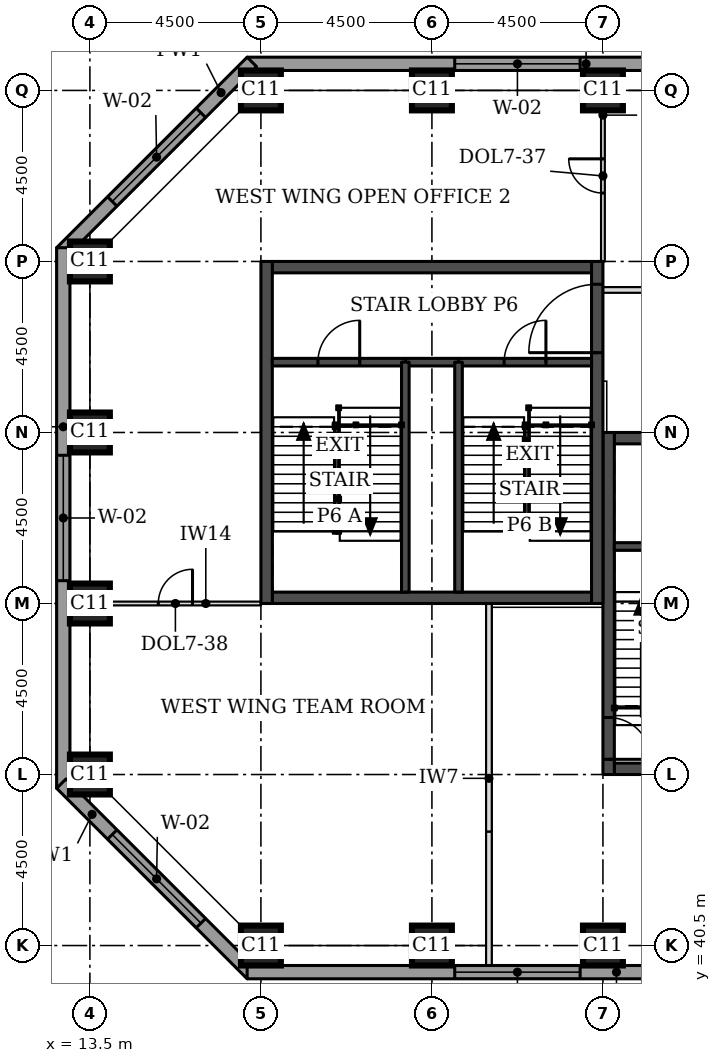
"""IFC4 building model, lengths in metres.
Left out: names, types, materials, properties, quantities, classifications, styles, units other than length and angle.
Written with IfcOpenShell. Run it as: python <this file> out.ifc"""

import sys

from ifc_helpers import new_model, si_unit, direction, frame, frame_2d, origin, origin_2d, place, context, subcontext, project, spatial, rectangle, extrude, element, fill, save


model = new_model("IFC4")
c1 = context("Model", 3, precision=1e-05, world=origin(), true_north=direction((0.0, 1.0)))
c2 = subcontext(c1, "Body", "Model", "MODEL_VIEW")
j1 = project(units=[si_unit("LENGTHUNIT", "METRE"), si_unit("PLANEANGLEUNIT", "RADIAN")], contexts=[c1])
p1 = place(None, origin())
s1 = spatial("IfcSite", under=j1, at=p1, CompositionType="ELEMENT")
p2 = place(p1, origin())
s2 = spatial("IfcBuilding", under=s1, at=p2, CompositionType="ELEMENT")
p3 = place(p2, frame((0.0, 0.0, 134.4)))
s3 = spatial("IfcBuildingStorey", under=s2, at=p3, CompositionType="ELEMENT", Elevation=134.4)
for number, where, z_axis, x_axis in (
    (1, (18.0, 40.5, 0.0), (0.0, 0.0, 1.0), (1.0, 0.0, 0.0)),
    (2, (22.5, 40.5, 0.0), (0.0, 0.0, 1.0), (1.0, 0.0, 0.0)),
    (3, (27.0, 40.5, 0.0), (0.0, 0.0, 1.0), (1.0, 0.0, 0.0)),
    (4, (13.5, 45.0, 0.0), (0.0, 0.0, 1.0), (1.0, 0.0, 0.0)),
    (5, (13.5, 49.5, 0.0), (0.0, 0.0, 1.0), (1.0, 0.0, 0.0)),
    (6, (13.5, 54.0, 0.0), (0.0, 0.0, 1.0), (1.0, 0.0, 0.0)),
    (7, (13.5, 58.5, 0.0), (0.0, 0.0, 1.0), (1.0, 0.0, 0.0)),
    (8, (18.0, 63.0, 0.0), (0.0, 0.0, 1.0), (1.0, 0.0, 0.0)),
    (9, (22.5, 63.0, 0.0), (0.0, 0.0, 1.0), (1.0, 0.0, 0.0)),
    (10, (27.0, 63.0, 0.0), (0.0, 0.0, 1.0), (1.0, 0.0, 0.0)),
):
    element("IfcColumn", number, at=place(p3, frame(where, z_axis=z_axis, x_axis=x_axis)), inside=s3, PredefinedType="COLUMN", context=c2, shape_type="SweptSolid", body=[
        extrude(rectangle(XDim=1.05, YDim=1.05, at=origin_2d()), origin(), (0.0, 0.0, 1.0), 3.7),
    ])
p4 = place(p3, frame((27.3, 45.15, 0.0), z_axis=(0.0, 0.0, 1.0), x_axis=(1.0, 0.0, 0.0)))
e11 = element("IfcWall", 11, at=p4, inside=s3, PredefinedType="SHEAR", context=c2, shape_type="SweptSolid", body=[
    extrude(rectangle(XDim=8.4, YDim=0.3, at=frame_2d((4.2, 0.0))), origin(), (0.0, 0.0, 1.0), 3.7),
])
p5 = place(p4, frame((5.2, 0.0, 0.0)))
e12 = element("IfcOpeningElement", 12, at=p5, cuts=e11, PredefinedType="OPENING", context=c2, shape_type="SweptSolid", body=[
    extrude(rectangle(XDim=1.0, YDim=2.1, at=frame_2d((0.5, 1.05))), frame((0.0, 0.16, 0.0), z_axis=(0.0, -1.0, 0.0), x_axis=(1.0, 0.0, 0.0)), (0.0, 0.0, 1.0), 0.32),
])
p6 = place(p3, frame((27.3, 53.85, 0.0), z_axis=(0.0, 0.0, 1.0), x_axis=(1.0, 0.0, 0.0)))
e13 = element("IfcWall", 13, at=p6, inside=s3, PredefinedType="SHEAR", context=c2, shape_type="SweptSolid", body=[
    extrude(rectangle(XDim=8.4, YDim=0.3, at=frame_2d((4.2, 0.0))), origin(), (0.0, 0.0, 1.0), 3.7),
])
p7 = place(p6, frame((6.4, 0.0, 0.0)))
e14 = element("IfcOpeningElement", 14, at=p7, cuts=e13, PredefinedType="OPENING", context=c2, shape_type="SweptSolid", body=[
    extrude(rectangle(XDim=1.1, YDim=2.1, at=frame_2d((0.55, 1.05))), frame((0.0, 0.16, 0.0), z_axis=(0.0, -1.0, 0.0), x_axis=(1.0, 0.0, 0.0)), (0.0, 0.0, 1.0), 0.32),
])
p8 = place(p3, frame((27.15, 45.0, 0.0), z_axis=(0.0, 0.0, 1.0), x_axis=(0.0, 1.0, 0.0)))
e15 = element("IfcWall", 15, at=p8, inside=s3, PredefinedType="SHEAR", context=c2, shape_type="SweptSolid", body=[
    extrude(rectangle(XDim=9.0, YDim=0.3, at=frame_2d((4.5, 0.0))), origin(), (0.0, 0.0, 1.0), 3.7),
])
p9 = place(p8, frame((0.4, 0.0, 0.0)))
e16 = element("IfcOpeningElement", 16, at=p9, cuts=e15, PredefinedType="OPENING", context=c2, shape_type="SweptSolid", body=[
    extrude(rectangle(XDim=1.1, YDim=2.1, at=frame_2d((0.55, 1.05))), frame((0.0, 0.16, 0.0), z_axis=(0.0, -1.0, 0.0), x_axis=(1.0, 0.0, 0.0)), (0.0, 0.0, 1.0), 0.32),
])
for number, where, z_axis, x_axis in (
    (17, (18.3, 49.65, 0.0), (0.0, 0.0, 1.0), (1.0, 0.0, 0.0)),
    (18, (18.3, 58.35, 0.0), (0.0, 0.0, 1.0), (1.0, 0.0, 0.0)),
):
    element("IfcWall", number, at=place(p3, frame(where, z_axis=z_axis, x_axis=x_axis)), inside=s3, PredefinedType="SHEAR", context=c2, shape_type="SweptSolid", body=[
        extrude(rectangle(XDim=8.4, YDim=0.3, at=frame_2d((4.2, 0.0))), origin(), (0.0, 0.0, 1.0), 3.7),
    ])
p10 = place(p3, frame((18.15, 49.5, 0.0), z_axis=(0.0, 0.0, 1.0), x_axis=(0.0, 1.0, 0.0)))
e19 = element("IfcWall", 19, at=p10, inside=s3, PredefinedType="SHEAR", context=c2, shape_type="SweptSolid", body=[
    extrude(rectangle(XDim=9.0, YDim=0.3, at=frame_2d((4.5, 0.0))), origin(), (0.0, 0.0, 1.0), 3.7),
])
p11 = place(p3, frame((26.85, 49.5, 0.0), z_axis=(0.0, 0.0, 1.0), x_axis=(0.0, 1.0, 0.0)))
e20 = element("IfcWall", 20, at=p11, inside=s3, PredefinedType="SHEAR", context=c2, shape_type="SweptSolid", body=[
    extrude(rectangle(XDim=9.0, YDim=0.3, at=frame_2d((4.5, 0.0))), origin(), (0.0, 0.0, 1.0), 3.7),
])
p12 = place(p11, frame((6.6, 0.0, 0.0)))
e21 = element("IfcOpeningElement", 21, at=p12, cuts=e20, PredefinedType="OPENING", context=c2, shape_type="SweptSolid", body=[
    extrude(rectangle(XDim=1.8, YDim=2.1, at=frame_2d((0.9, 1.05))), frame((0.0, 0.16, 0.0), z_axis=(0.0, -1.0, 0.0), x_axis=(1.0, 0.0, 0.0)), (0.0, 0.0, 1.0), 0.32),
])
p13 = place(p3, frame((35.475, 63.7, 0.0), z_axis=(0.0, 0.0, 1.0), x_axis=(-1.0, 0.0, 0.0)))
e22 = element("IfcWall", 22, at=p13, inside=s3, PredefinedType="STANDARD", context=c2, shape_type="SweptSolid", body=[
    extrude(rectangle(XDim=17.837, YDim=0.35, at=frame_2d((8.919, 0.0))), origin(), (0.0, 0.0, 1.0), 3.525),
])
p14 = place(p13, frame((0.5, 0.0, 0.9)))
e23 = element("IfcOpeningElement", 23, at=p14, cuts=e22, PredefinedType="OPENING", context=c2, shape_type="SweptSolid", body=[
    extrude(rectangle(XDim=3.3, YDim=1.9, at=frame_2d((1.65, 0.95))), frame((0.0, 0.185, 0.0), z_axis=(0.0, -1.0, 0.0), x_axis=(1.0, 0.0, 0.0)), (0.0, 0.0, 1.0), 0.37),
])
p15 = place(p13, frame((9.075, 0.0, 0.9)))
e24 = element("IfcOpeningElement", 24, at=p15, cuts=e22, PredefinedType="OPENING", context=c2, shape_type="SweptSolid", body=[
    extrude(rectangle(XDim=3.3, YDim=1.9, at=frame_2d((1.65, 0.95))), frame((0.0, 0.185, 0.0), z_axis=(0.0, -1.0, 0.0), x_axis=(1.0, 0.0, 0.0)), (0.0, 0.0, 1.0), 0.37),
])
p16 = place(p3, frame((17.761, 63.751, 0.0), z_axis=(0.0, 0.0, 1.0), x_axis=(-0.707106781187, -0.707106781187, 0.0)))
e25 = element("IfcWall", 25, at=p16, inside=s3, PredefinedType="STANDARD", context=c2, shape_type="SweptSolid", body=[
    extrude(rectangle(XDim=7.089, YDim=0.35, at=frame_2d((3.544, 0.0))), origin(), (0.0, 0.0, 1.0), 3.525),
])
p17 = place(p16, frame((1.894, 0.0, 0.9)))
e26 = element("IfcOpeningElement", 26, at=p17, cuts=e25, PredefinedType="OPENING", context=c2, shape_type="SweptSolid", body=[
    extrude(rectangle(XDim=3.3, YDim=1.9, at=frame_2d((1.65, 0.95))), frame((0.0, 0.185, 0.0), z_axis=(0.0, -1.0, 0.0), x_axis=(1.0, 0.0, 0.0)), (0.0, 0.0, 1.0), 0.37),
])
p18 = place(p3, frame((12.8, 58.862, 0.0), z_axis=(0.0, 0.0, 1.0), x_axis=(0.0, -1.0, 0.0)))
e27 = element("IfcWall", 27, at=p18, inside=s3, PredefinedType="STANDARD", context=c2, shape_type="SweptSolid", body=[
    extrude(rectangle(XDim=14.225, YDim=0.35, at=frame_2d((7.112, 0.0))), origin(), (0.0, 0.0, 1.0), 3.525),
])
p19 = place(p18, frame((5.462, 0.0, 0.9)))
e28 = element("IfcOpeningElement", 28, at=p19, cuts=e27, PredefinedType="OPENING", context=c2, shape_type="SweptSolid", body=[
    extrude(rectangle(XDim=3.3, YDim=1.9, at=frame_2d((1.65, 0.95))), frame((0.0, 0.185, 0.0), z_axis=(0.0, -1.0, 0.0), x_axis=(1.0, 0.0, 0.0)), (0.0, 0.0, 1.0), 0.37),
])
p20 = place(p3, frame((12.749, 44.761, 0.0), z_axis=(0.0, 0.0, 1.0), x_axis=(0.707106781187, -0.707106781187, 0.0)))
e29 = element("IfcWall", 29, at=p20, inside=s3, PredefinedType="STANDARD", context=c2, shape_type="SweptSolid", body=[
    extrude(rectangle(XDim=7.089, YDim=0.35, at=frame_2d((3.544, 0.0))), origin(), (0.0, 0.0, 1.0), 3.525),
])
p21 = place(p20, frame((1.894, 0.0, 0.9)))
e30 = element("IfcOpeningElement", 30, at=p21, cuts=e29, PredefinedType="OPENING", context=c2, shape_type="SweptSolid", body=[
    extrude(rectangle(XDim=3.3, YDim=1.9, at=frame_2d((1.65, 0.95))), frame((0.0, 0.185, 0.0), z_axis=(0.0, -1.0, 0.0), x_axis=(1.0, 0.0, 0.0)), (0.0, 0.0, 1.0), 0.37),
])
p22 = place(p3, frame((17.638, 39.8, 0.0), z_axis=(0.0, 0.0, 1.0), x_axis=(1.0, 0.0, 0.0)))
e31 = element("IfcWall", 31, at=p22, inside=s3, PredefinedType="STANDARD", context=c2, shape_type="SweptSolid", body=[
    extrude(rectangle(XDim=17.837, YDim=0.35, at=frame_2d((8.919, 0.0))), origin(), (0.0, 0.0, 1.0), 3.525),
])
p23 = place(p22, frame((5.462, 0.0, 0.9)))
e32 = element("IfcOpeningElement", 32, at=p23, cuts=e31, PredefinedType="OPENING", context=c2, shape_type="SweptSolid", body=[
    extrude(rectangle(XDim=3.3, YDim=1.9, at=frame_2d((1.65, 0.95))), frame((0.0, 0.185, 0.0), z_axis=(0.0, -1.0, 0.0), x_axis=(1.0, 0.0, 0.0)), (0.0, 0.0, 1.0), 0.37),
])
p24 = place(p22, frame((14.037, 0.0, 0.9)))
e33 = element("IfcOpeningElement", 33, at=p24, cuts=e31, PredefinedType="OPENING", context=c2, shape_type="SweptSolid", body=[
    extrude(rectangle(XDim=3.3, YDim=1.9, at=frame_2d((1.65, 0.95))), frame((0.0, 0.185, 0.0), z_axis=(0.0, -1.0, 0.0), x_axis=(1.0, 0.0, 0.0)), (0.0, 0.0, 1.0), 0.37),
])
p25 = place(p3, frame((24.0, 39.975, 0.0), z_axis=(0.0, 0.0, 1.0), x_axis=(0.0, 1.0, 0.0)))
e34 = element("IfcWall", 34, at=p25, inside=s3, PredefinedType="PARTITIONING", context=c2, shape_type="SweptSolid", body=[
    extrude(rectangle(XDim=3.525, YDim=0.15, at=frame_2d((1.762, 0.0))), origin(), (0.0, 0.0, 1.0), 3.55),
])
p26 = place(p3, frame((24.0, 43.5, 0.0), z_axis=(0.0, 0.0, 1.0), x_axis=(0.0, 1.0, 0.0)))
e35 = element("IfcWall", 35, at=p26, inside=s3, PredefinedType="PARTITIONING", context=c2, shape_type="SweptSolid", body=[
    extrude(rectangle(XDim=6.0, YDim=0.15, at=frame_2d((3.0, 0.0))), origin(), (0.0, 0.0, 1.0), 3.55),
])
p27 = place(p3, frame((27.0, 63.0, 0.0), z_axis=(0.0, 0.0, 1.0), x_axis=(0.0, -1.0, 0.0)))
e36 = element("IfcWall", 36, at=p27, inside=s3, PredefinedType="PARTITIONING", context=c2, shape_type="SweptSolid", body=[
    extrude(rectangle(XDim=4.5, YDim=0.1, at=frame_2d((2.25, 0.0))), origin(), (0.0, 0.0, 1.0), 3.55),
])
p28 = place(p27, frame((1.8, 0.0, 0.0)))
e37 = element("IfcOpeningElement", 37, at=p28, cuts=e36, PredefinedType="OPENING", context=c2, shape_type="SweptSolid", body=[
    extrude(rectangle(XDim=0.9, YDim=2.1, at=frame_2d((0.45, 1.05))), frame((0.0, 0.06, 0.0), z_axis=(0.0, -1.0, 0.0), x_axis=(1.0, 0.0, 0.0)), (0.0, 0.0, 1.0), 0.12),
])
p29 = place(p3, frame((13.5, 49.5, 0.0), z_axis=(0.0, 0.0, 1.0), x_axis=(1.0, 0.0, 0.0)))
e38 = element("IfcWall", 38, at=p29, inside=s3, PredefinedType="PARTITIONING", context=c2, shape_type="SweptSolid", body=[
    extrude(rectangle(XDim=4.5, YDim=0.1, at=frame_2d((2.25, 0.0))), origin(), (0.0, 0.0, 1.0), 3.55),
])
p30 = place(p29, frame((1.8, 0.0, 0.0)))
e39 = element("IfcOpeningElement", 39, at=p30, cuts=e38, PredefinedType="OPENING", context=c2, shape_type="SweptSolid", body=[
    extrude(rectangle(XDim=0.9, YDim=2.1, at=frame_2d((0.45, 1.05))), frame((0.0, 0.06, 0.0), z_axis=(0.0, -1.0, 0.0), x_axis=(1.0, 0.0, 0.0)), (0.0, 0.0, 1.0), 0.12),
])
p31 = place(p3, frame((27.0, 57.75, 0.0), z_axis=(0.0, 0.0, 1.0), x_axis=(1.0, 0.0, 0.0)))
e40 = element("IfcWall", 40, at=p31, inside=s3, PredefinedType="PARTITIONING", context=c2, shape_type="SweptSolid", body=[
    extrude(rectangle(XDim=2.4, YDim=0.15, at=frame_2d((1.2, 0.0))), origin(), (0.0, 0.0, 1.0), 3.55),
])
p32 = place(p3, frame((27.3, 51.0, 0.0), z_axis=(0.0, 0.0, 1.0), x_axis=(1.0, 0.0, 0.0)))
e41 = element("IfcWall", 41, at=p32, inside=s3, PredefinedType="SOLIDWALL", context=c2, shape_type="SweptSolid", body=[
    extrude(rectangle(XDim=3.0, YDim=0.2, at=frame_2d((1.5, 0.0))), origin(), (0.0, 0.0, 1.0), 3.55),
])
p33 = place(p3, frame((21.8, 55.85, 0.0), z_axis=(0.0, 0.0, 1.0), x_axis=(1.0, 0.0, 0.0)))
e42 = element("IfcWall", 42, at=p33, inside=s3, PredefinedType="SOLIDWALL", context=c2, shape_type="SweptSolid", body=[
    extrude(rectangle(XDim=1.4, YDim=0.2, at=frame_2d((0.7, 0.0))), origin(), (0.0, 0.0, 1.0), 3.55),
])
p34 = place(p3, frame((18.3, 55.85, 0.0), z_axis=(0.0, 0.0, 1.0), x_axis=(1.0, 0.0, 0.0)))
e43 = element("IfcWall", 43, at=p34, inside=s3, PredefinedType="SOLIDWALL", context=c2, shape_type="SweptSolid", body=[
    extrude(rectangle(XDim=3.5, YDim=0.2, at=frame_2d((1.75, 0.0))), origin(), (0.0, 0.0, 1.0), 3.55),
])
p35 = place(p34, frame((1.2, 0.0, 0.0)))
e44 = element("IfcOpeningElement", 44, at=p35, cuts=e43, PredefinedType="OPENING", context=c2, shape_type="SweptSolid", body=[
    extrude(rectangle(XDim=1.1, YDim=2.1, at=frame_2d((0.55, 1.05))), frame((0.0, 0.11, 0.0), z_axis=(0.0, -1.0, 0.0), x_axis=(1.0, 0.0, 0.0)), (0.0, 0.0, 1.0), 0.22),
])
p36 = place(p3, frame((23.2, 55.85, 0.0), z_axis=(0.0, 0.0, 1.0), x_axis=(1.0, 0.0, 0.0)))
e45 = element("IfcWall", 45, at=p36, inside=s3, PredefinedType="SOLIDWALL", context=c2, shape_type="SweptSolid", body=[
    extrude(rectangle(XDim=3.5, YDim=0.2, at=frame_2d((1.75, 0.0))), origin(), (0.0, 0.0, 1.0), 3.55),
])
p37 = place(p36, frame((1.2, 0.0, 0.0)))
e46 = element("IfcOpeningElement", 46, at=p37, cuts=e45, PredefinedType="OPENING", context=c2, shape_type="SweptSolid", body=[
    extrude(rectangle(XDim=1.1, YDim=2.1, at=frame_2d((0.55, 1.05))), frame((0.0, 0.11, 0.0), z_axis=(0.0, -1.0, 0.0), x_axis=(1.0, 0.0, 0.0)), (0.0, 0.0, 1.0), 0.22),
])
for number, where, z_axis, x_axis in (
    (47, (21.8, 49.8, 0.0), (0.0, 0.0, 1.0), (0.0, 1.0, 0.0)),
    (48, (23.2, 49.8, 0.0), (0.0, 0.0, 1.0), (0.0, 1.0, 0.0)),
):
    element("IfcWall", number, at=place(p3, frame(where, z_axis=z_axis, x_axis=x_axis)), inside=s3, PredefinedType="SOLIDWALL", context=c2, shape_type="SweptSolid", body=[
        extrude(rectangle(XDim=6.05, YDim=0.2, at=frame_2d((3.025, 0.0))), origin(), (0.0, 0.0, 1.0), 3.55),
    ])
p38 = place(p15, origin())
e49 = element("IfcWindow", 49, at=p38, inside=s3, PartitioningType="SINGLE_PANEL", PredefinedType="WINDOW", context=c2, shape_type="SweptSolid", body=[
    extrude(rectangle(XDim=3.3, YDim=1.9, at=frame_2d((1.65, 0.95))), frame((0.0, 0.085, 0.0), z_axis=(0.0, -1.0, 0.0), x_axis=(1.0, 0.0, 0.0)), (0.0, 0.0, 1.0), 0.06),
])
fill(e24, e49)
p39 = place(p17, origin())
e50 = element("IfcWindow", 50, at=p39, inside=s3, PartitioningType="SINGLE_PANEL", PredefinedType="WINDOW", context=c2, shape_type="SweptSolid", body=[
    extrude(rectangle(XDim=3.3, YDim=1.9, at=frame_2d((1.65, 0.95))), frame((0.0, 0.085, 0.0), z_axis=(0.0, -1.0, 0.0), x_axis=(1.0, 0.0, 0.0)), (0.0, 0.0, 1.0), 0.06),
])
fill(e26, e50)
p40 = place(p19, origin())
e51 = element("IfcWindow", 51, at=p40, inside=s3, PartitioningType="SINGLE_PANEL", PredefinedType="WINDOW", context=c2, shape_type="SweptSolid", body=[
    extrude(rectangle(XDim=3.3, YDim=1.9, at=frame_2d((1.65, 0.95))), frame((0.0, 0.085, 0.0), z_axis=(0.0, -1.0, 0.0), x_axis=(1.0, 0.0, 0.0)), (0.0, 0.0, 1.0), 0.06),
])
fill(e28, e51)
p41 = place(p21, origin())
e52 = element("IfcWindow", 52, at=p41, inside=s3, PartitioningType="SINGLE_PANEL", PredefinedType="WINDOW", context=c2, shape_type="SweptSolid", body=[
    extrude(rectangle(XDim=3.3, YDim=1.9, at=frame_2d((1.65, 0.95))), frame((0.0, 0.085, 0.0), z_axis=(0.0, -1.0, 0.0), x_axis=(1.0, 0.0, 0.0)), (0.0, 0.0, 1.0), 0.06),
])
fill(e30, e52)
p42 = place(p23, origin())
e53 = element("IfcWindow", 53, at=p42, inside=s3, PartitioningType="SINGLE_PANEL", PredefinedType="WINDOW", context=c2, shape_type="SweptSolid", body=[
    extrude(rectangle(XDim=3.3, YDim=1.9, at=frame_2d((1.65, 0.95))), frame((0.0, 0.085, 0.0), z_axis=(0.0, -1.0, 0.0), x_axis=(1.0, 0.0, 0.0)), (0.0, 0.0, 1.0), 0.06),
])
fill(e32, e53)
p43 = place(p28, frame((0.9, 0.0, 0.0), z_axis=(0.0, 0.0, 1.0), x_axis=(-1.0, 0.0, 0.0)))
e54 = element("IfcDoor", 54, at=p43, inside=s3, OperationType="SINGLE_SWING_RIGHT", PredefinedType="DOOR", context=c2, shape_type="SweptSolid", body=[
    extrude(rectangle(XDim=0.9, YDim=2.1, at=frame_2d((0.45, 1.05))), frame((0.0, 0.025, 0.0), z_axis=(0.0, -1.0, 0.0), x_axis=(1.0, 0.0, 0.0)), (0.0, 0.0, 1.0), 0.05),
])
fill(e37, e54)
p44 = place(p30, origin())
e55 = element("IfcDoor", 55, at=p44, inside=s3, OperationType="SINGLE_SWING_RIGHT", PredefinedType="DOOR", context=c2, shape_type="SweptSolid", body=[
    extrude(rectangle(XDim=0.9, YDim=2.1, at=frame_2d((0.45, 1.05))), frame((0.0, 0.025, 0.0), z_axis=(0.0, -1.0, 0.0), x_axis=(1.0, 0.0, 0.0)), (0.0, 0.0, 1.0), 0.05),
])
fill(e39, e55)
p45 = place(p9, frame((1.1, 0.0, 0.0), z_axis=(0.0, 0.0, 1.0), x_axis=(-1.0, 0.0, 0.0)))
e56 = element("IfcDoor", 56, at=p45, inside=s3, OperationType="SINGLE_SWING_RIGHT", PredefinedType="DOOR", context=c2, shape_type="SweptSolid", body=[
    extrude(rectangle(XDim=1.1, YDim=2.1, at=frame_2d((0.55, 1.05))), frame((0.0, 0.025, 0.0), z_axis=(0.0, -1.0, 0.0), x_axis=(1.0, 0.0, 0.0)), (0.0, 0.0, 1.0), 0.05),
])
fill(e16, e56)
p46 = place(p35, origin())
e57 = element("IfcDoor", 57, at=p46, inside=s3, OperationType="SINGLE_SWING_RIGHT", PredefinedType="DOOR", context=c2, shape_type="SweptSolid", body=[
    extrude(rectangle(XDim=1.1, YDim=2.1, at=frame_2d((0.55, 1.05))), frame((0.0, 0.025, 0.0), z_axis=(0.0, -1.0, 0.0), x_axis=(1.0, 0.0, 0.0)), (0.0, 0.0, 1.0), 0.05),
])
fill(e44, e57)
p47 = place(p37, origin())
e58 = element("IfcDoor", 58, at=p47, inside=s3, OperationType="SINGLE_SWING_RIGHT", PredefinedType="DOOR", context=c2, shape_type="SweptSolid", body=[
    extrude(rectangle(XDim=1.1, YDim=2.1, at=frame_2d((0.55, 1.05))), frame((0.0, 0.025, 0.0), z_axis=(0.0, -1.0, 0.0), x_axis=(1.0, 0.0, 0.0)), (0.0, 0.0, 1.0), 0.05),
])
fill(e46, e58)
p48 = place(p12, origin())
e59 = element("IfcDoor", 59, at=p48, inside=s3, OperationType="SINGLE_SWING_LEFT", PredefinedType="DOOR", context=c2, shape_type="SweptSolid", body=[
    extrude(rectangle(XDim=1.8, YDim=2.1, at=frame_2d((0.9, 1.05))), frame((0.0, 0.025, 0.0), z_axis=(0.0, -1.0, 0.0), x_axis=(1.0, 0.0, 0.0)), (0.0, 0.0, 1.0), 0.05),
])
fill(e21, e59)
save(model, sys.argv[1])
